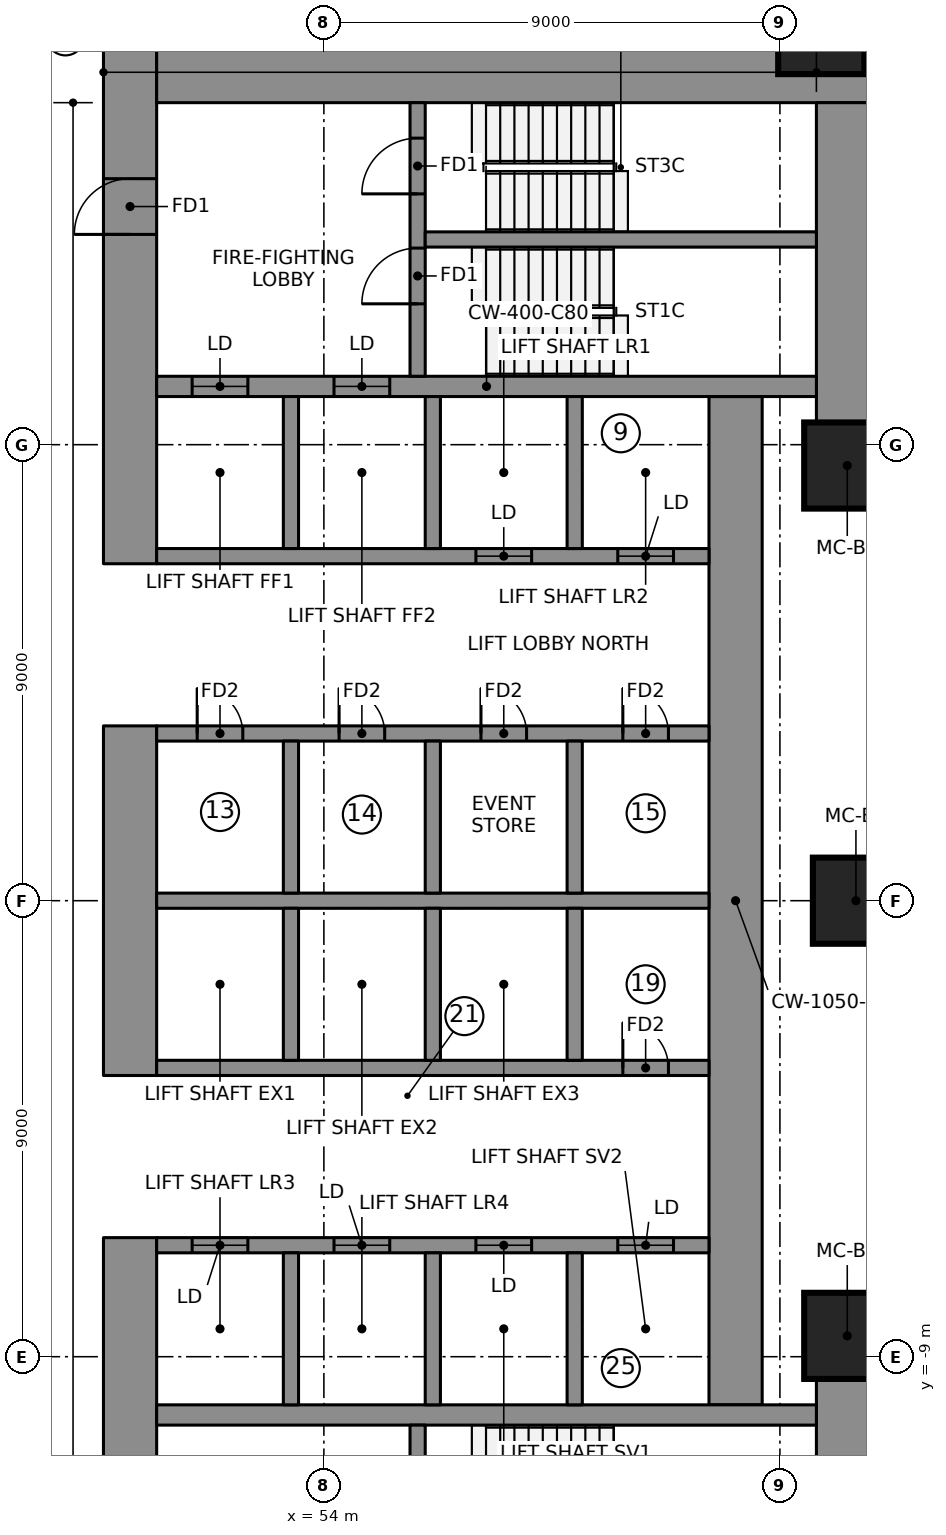
"""IFC4 building model, lengths in metres.
Left out: names, types, materials, properties, quantities, classifications, styles, units other than length and angle.
Written with IfcOpenShell. Run it as: python <this file> out.ifc"""

import sys

from ifc_helpers import new_model, si_unit, direction, frame, frame_2d, origin, origin_2d, place, context, subcontext, project, spatial, rectangle, extrude, element, fill, save


model = new_model("IFC4")
c1 = context("Model", 3, precision=1e-05, world=origin(), true_north=direction((0.0, 1.0)))
c2 = subcontext(c1, "Body", "Model", "MODEL_VIEW")
j1 = project(units=[si_unit("LENGTHUNIT", "METRE"), si_unit("PLANEANGLEUNIT", "RADIAN")], contexts=[c1])
p1 = place(None, origin())
s1 = spatial("IfcSite", under=j1, at=p1, CompositionType="ELEMENT")
p2 = place(p1, origin())
s2 = spatial("IfcBuilding", under=s1, at=p2, CompositionType="ELEMENT")
p3 = place(p2, frame((0.0, 0.0, 109.75)))
s3 = spatial("IfcBuildingStorey", under=s2, at=p3, CompositionType="ELEMENT", Elevation=109.75)
p4 = place(p3, frame((50.175, 6.65, 0.0), z_axis=(0.0, 0.0, 1.0), x_axis=(0.0, 1.0, 0.0)))
e1 = element("IfcWall", 1, at=p4, inside=s3, PredefinedType="SHEAR", context=c2, shape_type="SweptSolid", body=[
    extrude(rectangle(XDim=10.15, YDim=1.05, at=frame_2d((5.075, 0.0))), origin(), (0.0, 0.0, 1.0), 3.55),
])
p5 = place(p4, frame((6.5, 0.0, 0.0)))
e2 = element("IfcOpeningElement", 2, at=p5, cuts=e1, PredefinedType="OPENING", context=c2, shape_type="SweptSolid", body=[
    extrude(rectangle(XDim=1.1, YDim=2.1, at=frame_2d((0.55, 1.05))), frame((0.0, 0.535, 0.0), z_axis=(0.0, -1.0, 0.0), x_axis=(1.0, 0.0, 0.0)), (0.0, 0.0, 1.0), 1.07),
])
p6 = place(p3, frame((50.175, -3.45, 0.0), z_axis=(0.0, 0.0, 1.0), x_axis=(0.0, 1.0, 0.0)))
e3 = element("IfcWall", 3, at=p6, inside=s3, PredefinedType="SHEAR", context=c2, shape_type="SweptSolid", body=[
    extrude(rectangle(XDim=6.9, YDim=1.05, at=frame_2d((3.45, 0.0))), origin(), (0.0, 0.0, 1.0), 3.55),
])
p7 = place(p3, frame((50.175, -16.8, 0.0), z_axis=(0.0, 0.0, 1.0), x_axis=(0.0, 1.0, 0.0)))
e4 = element("IfcWall", 4, at=p7, inside=s3, PredefinedType="SHEAR", context=c2, shape_type="SweptSolid", body=[
    extrude(rectangle(XDim=10.15, YDim=1.05, at=frame_2d((5.075, 0.0))), origin(), (0.0, 0.0, 1.0), 3.55),
])
p8 = place(p7, frame((2.55, 0.0, 0.0)))
e5 = element("IfcOpeningElement", 5, at=p8, cuts=e4, PredefinedType="OPENING", context=c2, shape_type="SweptSolid", body=[
    extrude(rectangle(XDim=1.1, YDim=2.1, at=frame_2d((0.55, 1.05))), frame((0.0, 0.535, 0.0), z_axis=(0.0, -1.0, 0.0), x_axis=(1.0, 0.0, 0.0)), (0.0, 0.0, 1.0), 1.07),
])
p9 = place(p3, frame((50.7, 16.275, 0.0), z_axis=(0.0, 0.0, 1.0), x_axis=(1.0, 0.0, 0.0)))
e6 = element("IfcWall", 6, at=p9, inside=s3, PredefinedType="SHEAR", context=c2, shape_type="SweptSolid", body=[
    extrude(rectangle(XDim=14.07, YDim=1.05, at=frame_2d((7.035, 0.0))), origin(), (0.0, 0.0, 1.0), 3.55),
])
for number, where, z_axis, x_axis in (
    (7, (64.245, 9.389, 0.0), (0.0, 0.0, 1.0), (0.0, 1.0, 0.0)),
    (8, (64.245, -15.75, 0.0), (0.0, 0.0, 1.0), (0.0, 1.0, 0.0)),
):
    element("IfcWall", number, at=place(p3, frame(where, z_axis=z_axis, x_axis=x_axis)), inside=s3, PredefinedType="SHEAR", context=c2, shape_type="SweptSolid", body=[
        extrude(rectangle(XDim=6.361, YDim=1.05, at=frame_2d((3.181, 0.0))), origin(), (0.0, 0.0, 1.0), 3.55),
    ])
p10 = place(p3, frame((62.125, -9.95, 0.0), z_axis=(0.0, 0.0, 1.0), x_axis=(0.0, 1.0, 0.0)))
e9 = element("IfcWall", 9, at=p10, inside=s3, PredefinedType="SHEAR", context=c2, shape_type="SweptSolid", body=[
    extrude(rectangle(XDim=19.9, YDim=1.05, at=frame_2d((9.95, 0.0))), origin(), (0.0, 0.0, 1.0), 3.55),
])
p11 = place(p3, frame((50.7, 10.15, 0.0), z_axis=(0.0, 0.0, 1.0), x_axis=(1.0, 0.0, 0.0)))
e10 = element("IfcWall", 10, at=p11, inside=s3, PredefinedType="SHEAR", context=c2, shape_type="SweptSolid", body=[
    extrude(rectangle(XDim=13.02, YDim=0.4, at=frame_2d((6.51, 0.0))), origin(), (0.0, 0.0, 1.0), 3.55),
])
p12 = place(p11, frame((0.7, 0.0, 0.0)))
e11 = element("IfcOpeningElement", 11, at=p12, cuts=e10, PredefinedType="OPENING", context=c2, shape_type="SweptSolid", body=[
    extrude(rectangle(XDim=1.1, YDim=2.1, at=frame_2d((0.55, 1.05))), frame((0.0, 0.21, 0.0), z_axis=(0.0, -1.0, 0.0), x_axis=(1.0, 0.0, 0.0)), (0.0, 0.0, 1.0), 0.42),
])
p13 = place(p11, frame((3.5, 0.0, 0.0)))
e12 = element("IfcOpeningElement", 12, at=p13, cuts=e10, PredefinedType="OPENING", context=c2, shape_type="SweptSolid", body=[
    extrude(rectangle(XDim=1.1, YDim=2.1, at=frame_2d((0.55, 1.05))), frame((0.0, 0.21, 0.0), z_axis=(0.0, -1.0, 0.0), x_axis=(1.0, 0.0, 0.0)), (0.0, 0.0, 1.0), 0.42),
])
p14 = place(p3, frame((50.7, -10.15, 0.0), z_axis=(0.0, 0.0, 1.0), x_axis=(1.0, 0.0, 0.0)))
e13 = element("IfcWall", 13, at=p14, inside=s3, PredefinedType="SHEAR", context=c2, shape_type="SweptSolid", body=[
    extrude(rectangle(XDim=13.02, YDim=0.4, at=frame_2d((6.51, 0.0))), origin(), (0.0, 0.0, 1.0), 3.55),
])
p15 = place(p3, frame((50.7, 0.0, 0.0), z_axis=(0.0, 0.0, 1.0), x_axis=(1.0, 0.0, 0.0)))
e14 = element("IfcWall", 14, at=p15, inside=s3, PredefinedType="SHEAR", context=c2, shape_type="SweptSolid", body=[
    extrude(rectangle(XDim=10.9, YDim=0.3, at=frame_2d((5.45, 0.0))), origin(), (0.0, 0.0, 1.0), 3.55),
])
p16 = place(p3, frame((50.7, 3.3, 0.0), z_axis=(0.0, 0.0, 1.0), x_axis=(1.0, 0.0, 0.0)))
e15 = element("IfcWall", 15, at=p16, inside=s3, PredefinedType="SHEAR", context=c2, shape_type="SweptSolid", body=[
    extrude(rectangle(XDim=10.9, YDim=0.3, at=frame_2d((5.45, 0.0))), origin(), (0.0, 0.0, 1.0), 3.55),
])
p17 = place(p16, frame((0.8, 0.0, 0.0)))
e16 = element("IfcOpeningElement", 16, at=p17, cuts=e15, PredefinedType="OPENING", context=c2, shape_type="SweptSolid", body=[
    extrude(rectangle(XDim=0.9, YDim=2.1, at=frame_2d((0.45, 1.05))), frame((0.0, 0.16, 0.0), z_axis=(0.0, -1.0, 0.0), x_axis=(1.0, 0.0, 0.0)), (0.0, 0.0, 1.0), 0.32),
])
p18 = place(p16, frame((3.6, 0.0, 0.0)))
e17 = element("IfcOpeningElement", 17, at=p18, cuts=e15, PredefinedType="OPENING", context=c2, shape_type="SweptSolid", body=[
    extrude(rectangle(XDim=0.9, YDim=2.1, at=frame_2d((0.45, 1.05))), frame((0.0, 0.16, 0.0), z_axis=(0.0, -1.0, 0.0), x_axis=(1.0, 0.0, 0.0)), (0.0, 0.0, 1.0), 0.32),
])
p19 = place(p16, frame((6.4, 0.0, 0.0)))
e18 = element("IfcOpeningElement", 18, at=p19, cuts=e15, PredefinedType="OPENING", context=c2, shape_type="SweptSolid", body=[
    extrude(rectangle(XDim=0.9, YDim=2.1, at=frame_2d((0.45, 1.05))), frame((0.0, 0.16, 0.0), z_axis=(0.0, -1.0, 0.0), x_axis=(1.0, 0.0, 0.0)), (0.0, 0.0, 1.0), 0.32),
])
p20 = place(p16, frame((9.2, 0.0, 0.0)))
e19 = element("IfcOpeningElement", 19, at=p20, cuts=e15, PredefinedType="OPENING", context=c2, shape_type="SweptSolid", body=[
    extrude(rectangle(XDim=0.9, YDim=2.1, at=frame_2d((0.45, 1.05))), frame((0.0, 0.16, 0.0), z_axis=(0.0, -1.0, 0.0), x_axis=(1.0, 0.0, 0.0)), (0.0, 0.0, 1.0), 0.32),
])
p21 = place(p3, frame((50.7, 6.8, 0.0), z_axis=(0.0, 0.0, 1.0), x_axis=(1.0, 0.0, 0.0)))
e20 = element("IfcWall", 20, at=p21, inside=s3, PredefinedType="SHEAR", context=c2, shape_type="SweptSolid", body=[
    extrude(rectangle(XDim=10.9, YDim=0.3, at=frame_2d((5.45, 0.0))), origin(), (0.0, 0.0, 1.0), 3.55),
])
p22 = place(p21, frame((6.3, 0.0, 0.0)))
e21 = element("IfcOpeningElement", 21, at=p22, cuts=e20, PredefinedType="OPENING", context=c2, shape_type="SweptSolid", body=[
    extrude(rectangle(XDim=1.1, YDim=2.1, at=frame_2d((0.55, 1.05))), frame((0.0, 0.16, 0.0), z_axis=(0.0, -1.0, 0.0), x_axis=(1.0, 0.0, 0.0)), (0.0, 0.0, 1.0), 0.32),
])
p23 = place(p21, frame((9.1, 0.0, 0.0)))
e22 = element("IfcOpeningElement", 22, at=p23, cuts=e20, PredefinedType="OPENING", context=c2, shape_type="SweptSolid", body=[
    extrude(rectangle(XDim=1.1, YDim=2.1, at=frame_2d((0.55, 1.05))), frame((0.0, 0.16, 0.0), z_axis=(0.0, -1.0, 0.0), x_axis=(1.0, 0.0, 0.0)), (0.0, 0.0, 1.0), 0.32),
])
for number, where, z_axis, x_axis in (
    (23, (53.35, 0.15, 0.0), (0.0, 0.0, 1.0), (0.0, 1.0, 0.0)),
    (24, (53.35, 6.95, 0.0), (0.0, 0.0, 1.0), (0.0, 1.0, 0.0)),
    (25, (56.15, 0.15, 0.0), (0.0, 0.0, 1.0), (0.0, 1.0, 0.0)),
    (26, (56.15, 6.95, 0.0), (0.0, 0.0, 1.0), (0.0, 1.0, 0.0)),
    (27, (58.95, 0.15, 0.0), (0.0, 0.0, 1.0), (0.0, 1.0, 0.0)),
    (28, (58.95, 6.95, 0.0), (0.0, 0.0, 1.0), (0.0, 1.0, 0.0)),
):
    element("IfcWall", number, at=place(p3, frame(where, z_axis=z_axis, x_axis=x_axis)), inside=s3, PredefinedType="SHEAR", context=c2, shape_type="SweptSolid", body=[
        extrude(rectangle(XDim=3.0, YDim=0.3, at=frame_2d((1.5, 0.0))), origin(), (0.0, 0.0, 1.0), 3.55),
    ])
p24 = place(p3, frame((50.7, -3.3, 0.0), z_axis=(0.0, 0.0, 1.0), x_axis=(1.0, 0.0, 0.0)))
e29 = element("IfcWall", 29, at=p24, inside=s3, PredefinedType="SHEAR", context=c2, shape_type="SweptSolid", body=[
    extrude(rectangle(XDim=10.9, YDim=0.3, at=frame_2d((5.45, 0.0))), origin(), (0.0, 0.0, 1.0), 3.55),
])
p25 = place(p24, frame((9.2, 0.0, 0.0)))
e30 = element("IfcOpeningElement", 30, at=p25, cuts=e29, PredefinedType="OPENING", context=c2, shape_type="SweptSolid", body=[
    extrude(rectangle(XDim=0.9, YDim=2.1, at=frame_2d((0.45, 1.05))), frame((0.0, 0.16, 0.0), z_axis=(0.0, -1.0, 0.0), x_axis=(1.0, 0.0, 0.0)), (0.0, 0.0, 1.0), 0.32),
])
p26 = place(p3, frame((50.7, -6.8, 0.0), z_axis=(0.0, 0.0, 1.0), x_axis=(1.0, 0.0, 0.0)))
e31 = element("IfcWall", 31, at=p26, inside=s3, PredefinedType="SHEAR", context=c2, shape_type="SweptSolid", body=[
    extrude(rectangle(XDim=10.9, YDim=0.3, at=frame_2d((5.45, 0.0))), origin(), (0.0, 0.0, 1.0), 3.55),
])
p27 = place(p26, frame((0.7, 0.0, 0.0)))
e32 = element("IfcOpeningElement", 32, at=p27, cuts=e31, PredefinedType="OPENING", context=c2, shape_type="SweptSolid", body=[
    extrude(rectangle(XDim=1.1, YDim=2.1, at=frame_2d((0.55, 1.05))), frame((0.0, 0.16, 0.0), z_axis=(0.0, -1.0, 0.0), x_axis=(1.0, 0.0, 0.0)), (0.0, 0.0, 1.0), 0.32),
])
p28 = place(p26, frame((3.5, 0.0, 0.0)))
e33 = element("IfcOpeningElement", 33, at=p28, cuts=e31, PredefinedType="OPENING", context=c2, shape_type="SweptSolid", body=[
    extrude(rectangle(XDim=1.1, YDim=2.1, at=frame_2d((0.55, 1.05))), frame((0.0, 0.16, 0.0), z_axis=(0.0, -1.0, 0.0), x_axis=(1.0, 0.0, 0.0)), (0.0, 0.0, 1.0), 0.32),
])
p29 = place(p26, frame((6.3, 0.0, 0.0)))
e34 = element("IfcOpeningElement", 34, at=p29, cuts=e31, PredefinedType="OPENING", context=c2, shape_type="SweptSolid", body=[
    extrude(rectangle(XDim=1.1, YDim=2.1, at=frame_2d((0.55, 1.05))), frame((0.0, 0.16, 0.0), z_axis=(0.0, -1.0, 0.0), x_axis=(1.0, 0.0, 0.0)), (0.0, 0.0, 1.0), 0.32),
])
p30 = place(p26, frame((9.1, 0.0, 0.0)))
e35 = element("IfcOpeningElement", 35, at=p30, cuts=e31, PredefinedType="OPENING", context=c2, shape_type="SweptSolid", body=[
    extrude(rectangle(XDim=1.1, YDim=2.1, at=frame_2d((0.55, 1.05))), frame((0.0, 0.16, 0.0), z_axis=(0.0, -1.0, 0.0), x_axis=(1.0, 0.0, 0.0)), (0.0, 0.0, 1.0), 0.32),
])
for number, where, z_axis, x_axis in (
    (36, (53.35, -3.15, 0.0), (0.0, 0.0, 1.0), (0.0, 1.0, 0.0)),
    (37, (53.35, -9.95, 0.0), (0.0, 0.0, 1.0), (0.0, 1.0, 0.0)),
    (38, (56.15, -3.15, 0.0), (0.0, 0.0, 1.0), (0.0, 1.0, 0.0)),
    (39, (56.15, -9.95, 0.0), (0.0, 0.0, 1.0), (0.0, 1.0, 0.0)),
    (40, (58.95, -3.15, 0.0), (0.0, 0.0, 1.0), (0.0, 1.0, 0.0)),
    (41, (58.95, -9.95, 0.0), (0.0, 0.0, 1.0), (0.0, 1.0, 0.0)),
):
    element("IfcWall", number, at=place(p3, frame(where, z_axis=z_axis, x_axis=x_axis)), inside=s3, PredefinedType="SHEAR", context=c2, shape_type="SweptSolid", body=[
        extrude(rectangle(XDim=3.0, YDim=0.3, at=frame_2d((1.5, 0.0))), origin(), (0.0, 0.0, 1.0), 3.55),
    ])
p31 = place(p3, frame((55.85, 10.35, 0.0), z_axis=(0.0, 0.0, 1.0), x_axis=(0.0, 1.0, 0.0)))
e42 = element("IfcWall", 42, at=p31, inside=s3, PredefinedType="SHEAR", context=c2, shape_type="SweptSolid", body=[
    extrude(rectangle(XDim=5.4, YDim=0.3, at=frame_2d((2.7, 0.0))), origin(), (0.0, 0.0, 1.0), 3.55),
])
p32 = place(p31, frame((1.43, 0.0, 0.0)))
e43 = element("IfcOpeningElement", 43, at=p32, cuts=e42, PredefinedType="OPENING", context=c2, shape_type="SweptSolid", body=[
    extrude(rectangle(XDim=1.1, YDim=2.1, at=frame_2d((0.55, 1.05))), frame((0.0, 0.16, 0.0), z_axis=(0.0, -1.0, 0.0), x_axis=(1.0, 0.0, 0.0)), (0.0, 0.0, 1.0), 0.32),
])
p33 = place(p31, frame((3.6, 0.0, 0.0)))
e44 = element("IfcOpeningElement", 44, at=p33, cuts=e42, PredefinedType="OPENING", context=c2, shape_type="SweptSolid", body=[
    extrude(rectangle(XDim=1.1, YDim=2.1, at=frame_2d((0.55, 1.05))), frame((0.0, 0.16, 0.0), z_axis=(0.0, -1.0, 0.0), x_axis=(1.0, 0.0, 0.0)), (0.0, 0.0, 1.0), 0.32),
])
p34 = place(p3, frame((55.85, -15.75, 0.0), z_axis=(0.0, 0.0, 1.0), x_axis=(0.0, 1.0, 0.0)))
e45 = element("IfcWall", 45, at=p34, inside=s3, PredefinedType="SHEAR", context=c2, shape_type="SweptSolid", body=[
    extrude(rectangle(XDim=5.4, YDim=0.3, at=frame_2d((2.7, 0.0))), origin(), (0.0, 0.0, 1.0), 3.55),
])
p35 = place(p34, frame((3.6, 0.0, 0.0)))
e46 = element("IfcOpeningElement", 46, at=p35, cuts=e45, PredefinedType="OPENING", context=c2, shape_type="SweptSolid", body=[
    extrude(rectangle(XDim=1.1, YDim=2.1, at=frame_2d((0.55, 1.05))), frame((0.0, 0.16, 0.0), z_axis=(0.0, -1.0, 0.0), x_axis=(1.0, 0.0, 0.0)), (0.0, 0.0, 1.0), 0.32),
])
p36 = place(p34, frame((0.8, 0.0, 0.0)))
e47 = element("IfcOpeningElement", 47, at=p36, cuts=e45, PredefinedType="OPENING", context=c2, shape_type="SweptSolid", body=[
    extrude(rectangle(XDim=0.9, YDim=2.1, at=frame_2d((0.45, 1.05))), frame((0.0, 0.16, 0.0), z_axis=(0.0, -1.0, 0.0), x_axis=(1.0, 0.0, 0.0)), (0.0, 0.0, 1.0), 0.32),
])
p37 = place(p3, frame((56.0, 13.05, 0.0), z_axis=(0.0, 0.0, 1.0), x_axis=(1.0, 0.0, 0.0)))
e48 = element("IfcWall", 48, at=p37, inside=s3, PredefinedType="SHEAR", context=c2, shape_type="SweptSolid", body=[
    extrude(rectangle(XDim=7.72, YDim=0.3, at=frame_2d((3.86, 0.0))), origin(), (0.0, 0.0, 1.0), 3.55),
])
for number, where, z_axis, x_axis in (
    (49, (64.329, -8.589, 0.0), (0.0, 0.0, 1.0), (1.0, 0.0, 0.0)),
    (50, (64.5, 0.0, 0.0), (0.0, 0.0, 1.0), (1.0, 0.0, 0.0)),
    (51, (64.329, 8.589, 0.0), (0.0, 0.0, 1.0), (1.0, 0.0, 0.0)),
    (52, (63.816, 17.164, 0.0), (0.0, 0.0, 1.0), (1.0, 0.0, 0.0)),
):
    element("IfcColumn", number, at=place(p3, frame(where, z_axis=z_axis, x_axis=x_axis)), inside=s3, PredefinedType="COLUMN", context=c2, shape_type="SweptSolid", body=[
        extrude(rectangle(XDim=1.7, YDim=1.7, at=origin_2d()), origin(), (0.0, 0.0, 1.0), 3.55),
    ])
p38 = place(p12, origin())
e53 = element("IfcDoor", 53, at=p38, inside=s3, OperationType="DOUBLE_DOOR_SLIDING", PredefinedType="DOOR", context=c2, shape_type="SweptSolid", body=[
    extrude(rectangle(XDim=1.1, YDim=2.1, at=frame_2d((0.55, 1.05))), frame((0.0, 0.025, 0.0), z_axis=(0.0, -1.0, 0.0), x_axis=(1.0, 0.0, 0.0)), (0.0, 0.0, 1.0), 0.05),
])
fill(e11, e53)
p39 = place(p13, origin())
e54 = element("IfcDoor", 54, at=p39, inside=s3, OperationType="DOUBLE_DOOR_SLIDING", PredefinedType="DOOR", context=c2, shape_type="SweptSolid", body=[
    extrude(rectangle(XDim=1.1, YDim=2.1, at=frame_2d((0.55, 1.05))), frame((0.0, 0.025, 0.0), z_axis=(0.0, -1.0, 0.0), x_axis=(1.0, 0.0, 0.0)), (0.0, 0.0, 1.0), 0.05),
])
fill(e12, e54)
p40 = place(p22, origin())
e55 = element("IfcDoor", 55, at=p40, inside=s3, OperationType="DOUBLE_DOOR_SLIDING", PredefinedType="DOOR", context=c2, shape_type="SweptSolid", body=[
    extrude(rectangle(XDim=1.1, YDim=2.1, at=frame_2d((0.55, 1.05))), frame((0.0, 0.025, 0.0), z_axis=(0.0, -1.0, 0.0), x_axis=(1.0, 0.0, 0.0)), (0.0, 0.0, 1.0), 0.05),
])
fill(e21, e55)
p41 = place(p23, origin())
e56 = element("IfcDoor", 56, at=p41, inside=s3, OperationType="DOUBLE_DOOR_SLIDING", PredefinedType="DOOR", context=c2, shape_type="SweptSolid", body=[
    extrude(rectangle(XDim=1.1, YDim=2.1, at=frame_2d((0.55, 1.05))), frame((0.0, 0.025, 0.0), z_axis=(0.0, -1.0, 0.0), x_axis=(1.0, 0.0, 0.0)), (0.0, 0.0, 1.0), 0.05),
])
fill(e22, e56)
p42 = place(p27, origin())
e57 = element("IfcDoor", 57, at=p42, inside=s3, OperationType="DOUBLE_DOOR_SLIDING", PredefinedType="DOOR", context=c2, shape_type="SweptSolid", body=[
    extrude(rectangle(XDim=1.1, YDim=2.1, at=frame_2d((0.55, 1.05))), frame((0.0, 0.025, 0.0), z_axis=(0.0, -1.0, 0.0), x_axis=(1.0, 0.0, 0.0)), (0.0, 0.0, 1.0), 0.05),
])
fill(e32, e57)
p43 = place(p28, origin())
e58 = element("IfcDoor", 58, at=p43, inside=s3, OperationType="DOUBLE_DOOR_SLIDING", PredefinedType="DOOR", context=c2, shape_type="SweptSolid", body=[
    extrude(rectangle(XDim=1.1, YDim=2.1, at=frame_2d((0.55, 1.05))), frame((0.0, 0.025, 0.0), z_axis=(0.0, -1.0, 0.0), x_axis=(1.0, 0.0, 0.0)), (0.0, 0.0, 1.0), 0.05),
])
fill(e33, e58)
p44 = place(p29, origin())
e59 = element("IfcDoor", 59, at=p44, inside=s3, OperationType="DOUBLE_DOOR_SLIDING", PredefinedType="DOOR", context=c2, shape_type="SweptSolid", body=[
    extrude(rectangle(XDim=1.1, YDim=2.1, at=frame_2d((0.55, 1.05))), frame((0.0, 0.025, 0.0), z_axis=(0.0, -1.0, 0.0), x_axis=(1.0, 0.0, 0.0)), (0.0, 0.0, 1.0), 0.05),
])
fill(e34, e59)
p45 = place(p30, origin())
e60 = element("IfcDoor", 60, at=p45, inside=s3, OperationType="DOUBLE_DOOR_SLIDING", PredefinedType="DOOR", context=c2, shape_type="SweptSolid", body=[
    extrude(rectangle(XDim=1.1, YDim=2.1, at=frame_2d((0.55, 1.05))), frame((0.0, 0.025, 0.0), z_axis=(0.0, -1.0, 0.0), x_axis=(1.0, 0.0, 0.0)), (0.0, 0.0, 1.0), 0.05),
])
fill(e35, e60)
p46 = place(p32, origin())
e61 = element("IfcDoor", 61, at=p46, inside=s3, OperationType="SINGLE_SWING_RIGHT", PredefinedType="DOOR", context=c2, shape_type="SweptSolid", body=[
    extrude(rectangle(XDim=1.1, YDim=2.1, at=frame_2d((0.55, 1.05))), frame((0.0, 0.025, 0.0), z_axis=(0.0, -1.0, 0.0), x_axis=(1.0, 0.0, 0.0)), (0.0, 0.0, 1.0), 0.05),
])
fill(e43, e61)
p47 = place(p33, origin())
e62 = element("IfcDoor", 62, at=p47, inside=s3, OperationType="SINGLE_SWING_RIGHT", PredefinedType="DOOR", context=c2, shape_type="SweptSolid", body=[
    extrude(rectangle(XDim=1.1, YDim=2.1, at=frame_2d((0.55, 1.05))), frame((0.0, 0.025, 0.0), z_axis=(0.0, -1.0, 0.0), x_axis=(1.0, 0.0, 0.0)), (0.0, 0.0, 1.0), 0.05),
])
fill(e44, e62)
p48 = place(p5, origin())
e63 = element("IfcDoor", 63, at=p48, inside=s3, OperationType="SINGLE_SWING_RIGHT", PredefinedType="DOOR", context=c2, shape_type="SweptSolid", body=[
    extrude(rectangle(XDim=1.1, YDim=2.1, at=frame_2d((0.55, 1.05))), frame((0.0, 0.025, 0.0), z_axis=(0.0, -1.0, 0.0), x_axis=(1.0, 0.0, 0.0)), (0.0, 0.0, 1.0), 0.05),
])
fill(e2, e63)
p49 = place(p17, origin())
e64 = element("IfcDoor", 64, at=p49, inside=s3, OperationType="SINGLE_SWING_LEFT", PredefinedType="DOOR", context=c2, shape_type="SweptSolid", body=[
    extrude(rectangle(XDim=0.9, YDim=2.1, at=frame_2d((0.45, 1.05))), frame((0.0, 0.025, 0.0), z_axis=(0.0, -1.0, 0.0), x_axis=(1.0, 0.0, 0.0)), (0.0, 0.0, 1.0), 0.05),
])
fill(e16, e64)
p50 = place(p18, origin())
e65 = element("IfcDoor", 65, at=p50, inside=s3, OperationType="SINGLE_SWING_LEFT", PredefinedType="DOOR", context=c2, shape_type="SweptSolid", body=[
    extrude(rectangle(XDim=0.9, YDim=2.1, at=frame_2d((0.45, 1.05))), frame((0.0, 0.025, 0.0), z_axis=(0.0, -1.0, 0.0), x_axis=(1.0, 0.0, 0.0)), (0.0, 0.0, 1.0), 0.05),
])
fill(e17, e65)
p51 = place(p19, origin())
e66 = element("IfcDoor", 66, at=p51, inside=s3, OperationType="SINGLE_SWING_LEFT", PredefinedType="DOOR", context=c2, shape_type="SweptSolid", body=[
    extrude(rectangle(XDim=0.9, YDim=2.1, at=frame_2d((0.45, 1.05))), frame((0.0, 0.025, 0.0), z_axis=(0.0, -1.0, 0.0), x_axis=(1.0, 0.0, 0.0)), (0.0, 0.0, 1.0), 0.05),
])
fill(e18, e66)
p52 = place(p20, origin())
e67 = element("IfcDoor", 67, at=p52, inside=s3, OperationType="SINGLE_SWING_LEFT", PredefinedType="DOOR", context=c2, shape_type="SweptSolid", body=[
    extrude(rectangle(XDim=0.9, YDim=2.1, at=frame_2d((0.45, 1.05))), frame((0.0, 0.025, 0.0), z_axis=(0.0, -1.0, 0.0), x_axis=(1.0, 0.0, 0.0)), (0.0, 0.0, 1.0), 0.05),
])
fill(e19, e67)
p53 = place(p25, origin())
e68 = element("IfcDoor", 68, at=p53, inside=s3, OperationType="SINGLE_SWING_LEFT", PredefinedType="DOOR", context=c2, shape_type="SweptSolid", body=[
    extrude(rectangle(XDim=0.9, YDim=2.1, at=frame_2d((0.45, 1.05))), frame((0.0, 0.025, 0.0), z_axis=(0.0, -1.0, 0.0), x_axis=(1.0, 0.0, 0.0)), (0.0, 0.0, 1.0), 0.05),
])
fill(e30, e68)
save(model, sys.argv[1])
